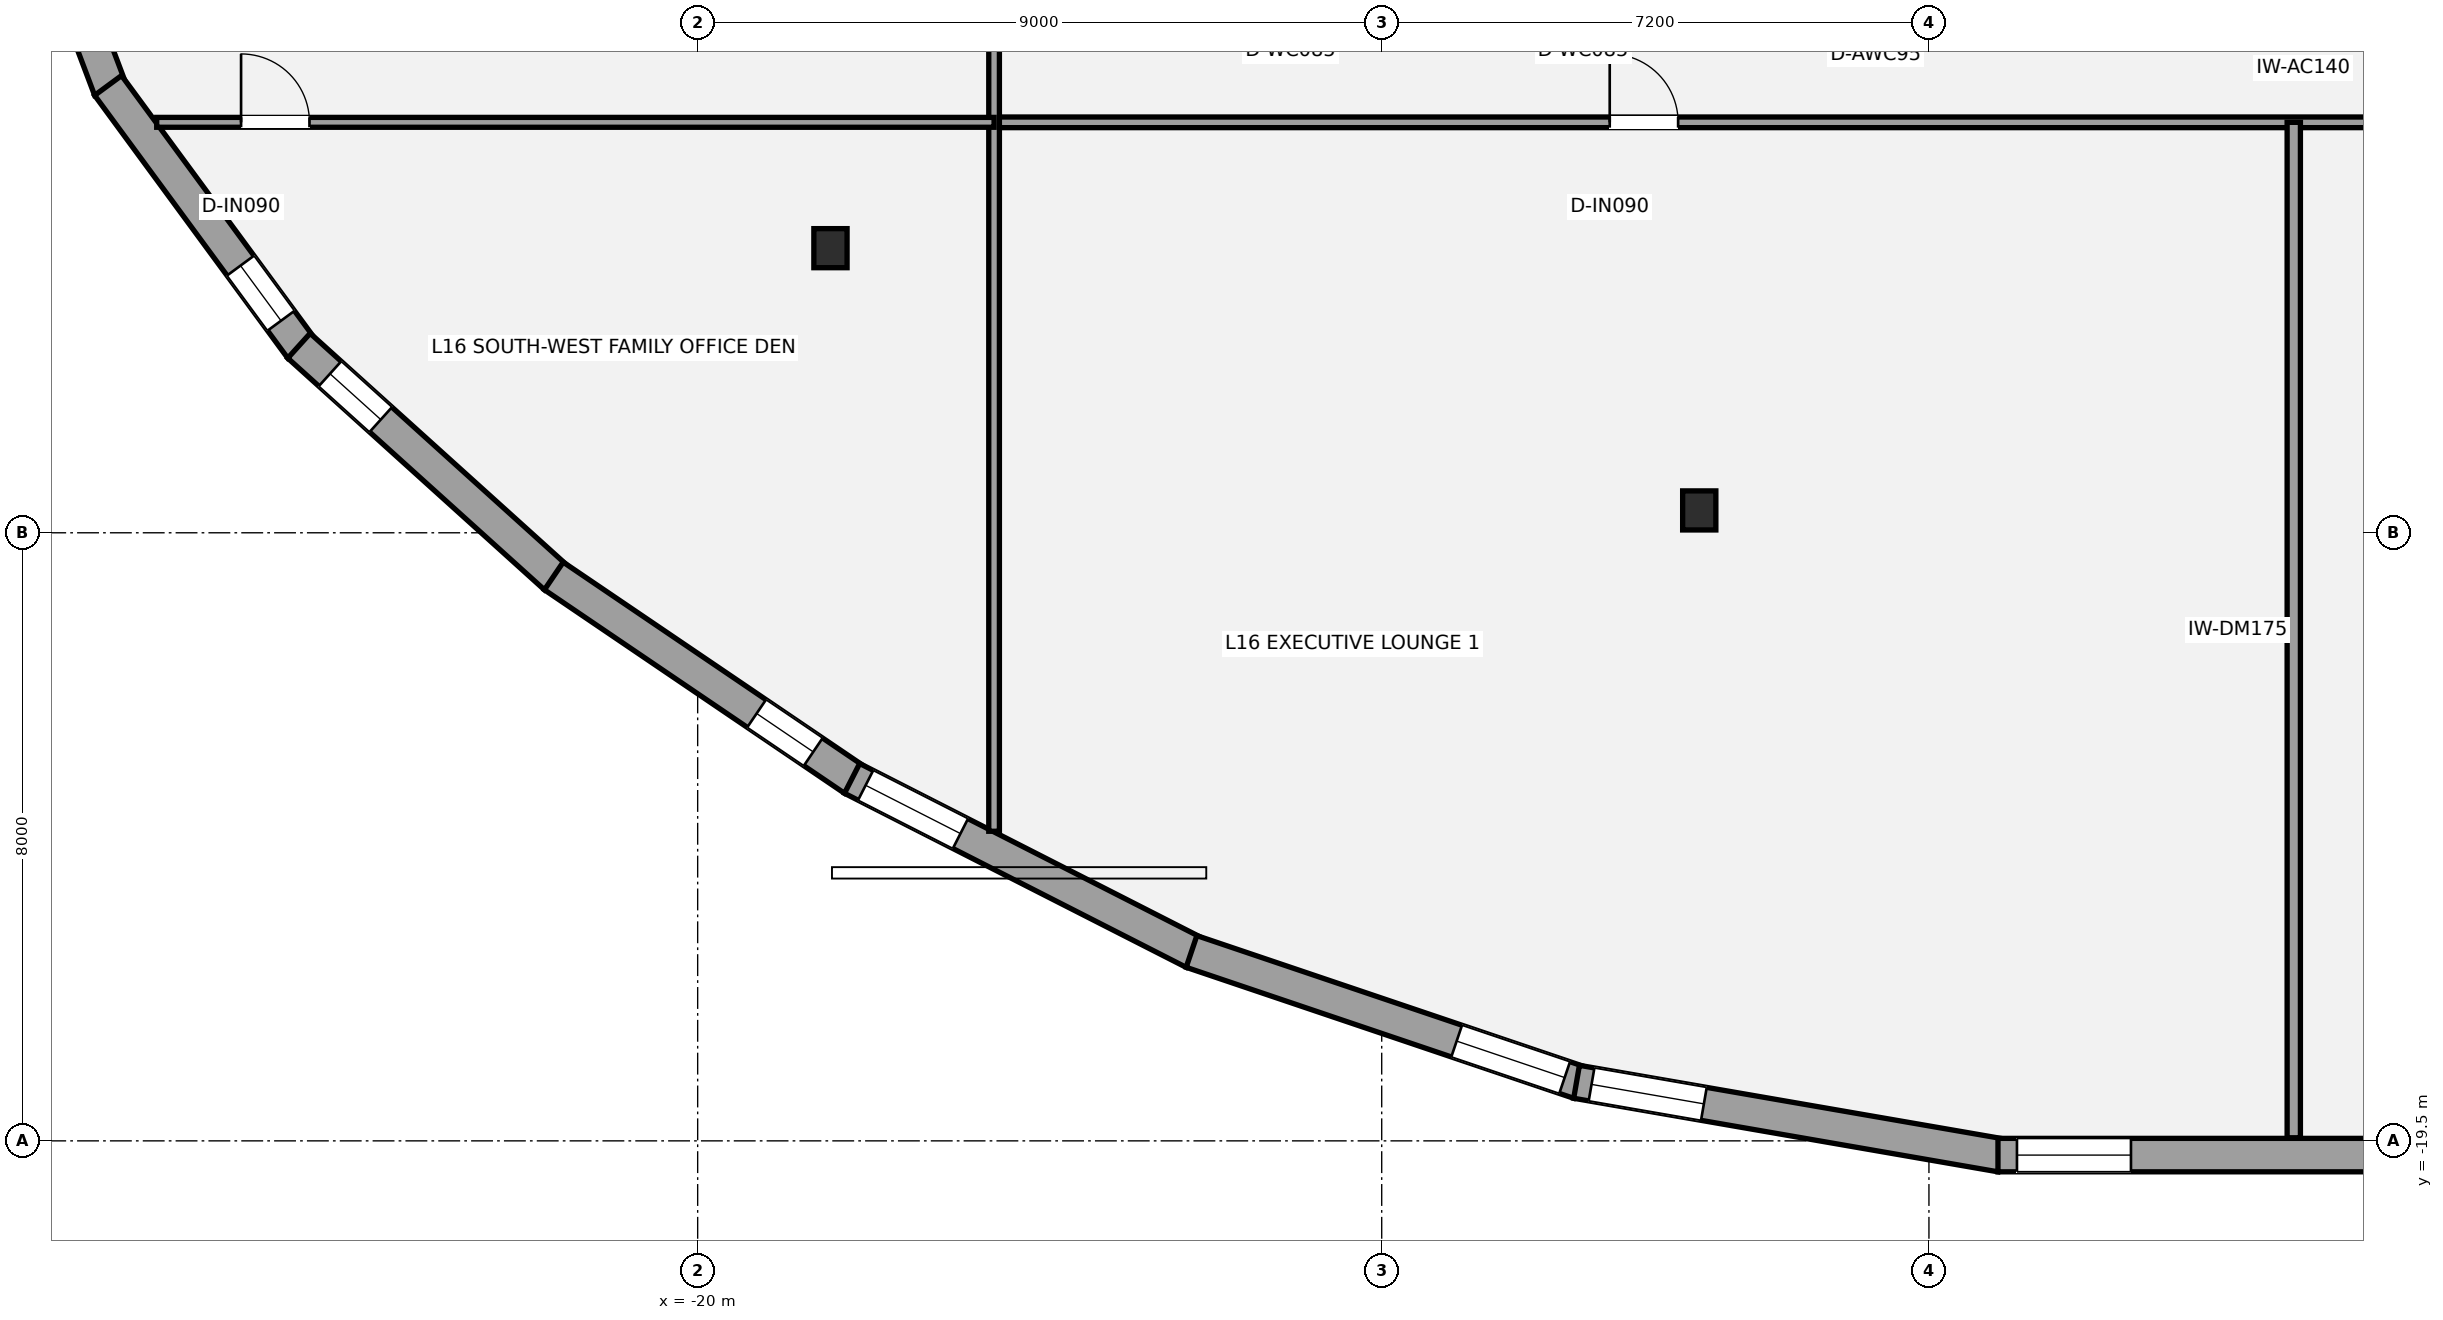
"""IFC4 building model, lengths in metres.
Left out: names, types, materials, properties, quantities, classifications, styles, units other than length and angle.
Written with IfcOpenShell. Run it as: python <this file> out.ifc"""

import sys

from ifc_helpers import new_model, si_unit, direction, frame, frame_2d, origin, origin_2d, place, context, subcontext, project, spatial, rectangle, i_section, extrude, element, fill, save


model = new_model("IFC4")
c1 = context("Model", 3, precision=1e-05, world=origin(), true_north=direction((0.0, 1.0)))
c2 = subcontext(c1, "Body", "Model", "MODEL_VIEW")
j1 = project(units=[si_unit("LENGTHUNIT", "METRE"), si_unit("PLANEANGLEUNIT", "RADIAN")], contexts=[c1])
p1 = place(None, origin())
s1 = spatial("IfcSite", under=j1, at=p1, CompositionType="ELEMENT")
p2 = place(p1, origin())
s2 = spatial("IfcBuilding", under=s1, at=p2, CompositionType="ELEMENT")
p3 = place(p2, frame((0.0, 0.0, 63.0)))
s3 = spatial("IfcBuildingStorey", under=s2, at=p3, CompositionType="ELEMENT", Elevation=63.0)
for number, where, z_axis, x_axis in (
    (1, (-18.253, -7.756, 0.0), (0.0, 0.0, 1.0), (1.0, 0.0, 0.0)),
    (2, (-6.822, -11.206, 0.0), (0.0, 0.0, 1.0), (1.0, 0.0, 0.0)),
):
    element("IfcColumn", number, at=place(p3, frame(where, z_axis=z_axis, x_axis=x_axis)), inside=s3, PredefinedType="COLUMN", context=c2, shape_type="SweptSolid", body=[
        extrude(i_section(OverallWidth=0.437, OverallDepth=0.514, WebThickness=0.061, FlangeThickness=0.097, at=origin_2d()), origin(), (0.0, 0.0, 1.0), 3.6),
    ])
p4 = place(p3, frame((-27.729, -5.668, 0.0), z_axis=(0.0, 0.0, 1.0), x_axis=(-0.352750180024, 0.935717537771, 0.0)))
e3 = element("IfcWall", 3, at=p4, inside=s3, PredefinedType="STANDARD", context=c2, shape_type="SweptSolid", body=[
    extrude(rectangle(XDim=4.045, YDim=0.44, at=frame_2d((2.022, 0.0))), origin(), (0.0, 0.0, 1.0), 2.529),
])
p5 = place(p4, frame((2.845, 0.0, 0.58)))
e4 = element("IfcOpeningElement", 4, at=p5, cuts=e3, PredefinedType="OPENING", context=c2, shape_type="SweptSolid", body=[
    extrude(rectangle(XDim=0.9, YDim=1.35, at=frame_2d((0.45, 0.675))), frame((0.0, 0.23, 0.0), z_axis=(0.0, -1.0, 0.0), x_axis=(1.0, 0.0, 0.0)), (0.0, 0.0, 1.0), 0.46),
])
p6 = place(p3, frame((-25.216, -9.072, 0.0), z_axis=(0.0, 0.0, 1.0), x_axis=(-0.592261182237, 0.80574604685, 0.0)))
e5 = element("IfcWall", 5, at=p6, inside=s3, PredefinedType="STANDARD", context=c2, shape_type="SweptSolid", body=[
    extrude(rectangle(XDim=4.291, YDim=0.44, at=frame_2d((2.146, 0.0))), origin(), (0.0, 0.0, 1.0), 2.529),
])
p7 = place(p6, frame((0.449, 0.0, 0.58)))
e6 = element("IfcOpeningElement", 6, at=p7, cuts=e5, PredefinedType="OPENING", context=c2, shape_type="SweptSolid", body=[
    extrude(rectangle(XDim=0.9, YDim=1.35, at=frame_2d((0.45, 0.675))), frame((0.0, 0.23, 0.0), z_axis=(0.0, -1.0, 0.0), x_axis=(1.0, 0.0, 0.0)), (0.0, 0.0, 1.0), 0.46),
])
p8 = place(p3, frame((-21.869, -12.087, 0.0), z_axis=(0.0, 0.0, 1.0), x_axis=(-0.742354052059, 0.670007806963, 0.0)))
e7 = element("IfcWall", 7, at=p8, inside=s3, PredefinedType="STANDARD", context=c2, shape_type="SweptSolid", body=[
    extrude(rectangle(XDim=4.549, YDim=0.44, at=frame_2d((2.274, 0.0))), origin(), (0.0, 0.0, 1.0), 2.529),
])
p9 = place(p8, frame((3.099, 0.0, 0.58)))
e8 = element("IfcOpeningElement", 8, at=p9, cuts=e7, PredefinedType="OPENING", context=c2, shape_type="SweptSolid", body=[
    extrude(rectangle(XDim=0.9, YDim=1.35, at=frame_2d((0.45, 0.675))), frame((0.0, 0.23, 0.0), z_axis=(0.0, -1.0, 0.0), x_axis=(1.0, 0.0, 0.0)), (0.0, 0.0, 1.0), 0.46),
])
p10 = place(p3, frame((-17.945, -14.745, 0.0), z_axis=(0.0, 0.0, 1.0), x_axis=(-0.827693991977, 0.561179699959, 0.0)))
e9 = element("IfcWall", 9, at=p10, inside=s3, PredefinedType="STANDARD", context=c2, shape_type="SweptSolid", body=[
    extrude(rectangle(XDim=4.77, YDim=0.44, at=frame_2d((2.385, 0.0))), origin(), (0.0, 0.0, 1.0), 2.529),
])
p11 = place(p10, frame((0.646, 0.0, 0.58)))
e10 = element("IfcOpeningElement", 10, at=p11, cuts=e9, PredefinedType="OPENING", context=c2, shape_type="SweptSolid", body=[
    extrude(rectangle(XDim=0.9, YDim=1.35, at=frame_2d((0.45, 0.675))), frame((0.0, 0.23, 0.0), z_axis=(0.0, -1.0, 0.0), x_axis=(1.0, 0.0, 0.0)), (0.0, 0.0, 1.0), 0.46),
])
p12 = place(p3, frame((-13.473, -17.021, 0.0), z_axis=(0.0, 0.0, 1.0), x_axis=(-0.891072734441, 0.45386053137, 0.0)))
e11 = element("IfcWall", 11, at=p12, inside=s3, PredefinedType="STANDARD", context=c2, shape_type="SweptSolid", body=[
    extrude(rectangle(XDim=5.045, YDim=0.44, at=frame_2d((2.522, 0.0))), origin(), (0.0, 0.0, 1.0), 2.529),
])
p13 = place(p12, frame((3.445, 0.0, 0.58)))
e12 = element("IfcOpeningElement", 12, at=p13, cuts=e11, PredefinedType="OPENING", context=c2, shape_type="SweptSolid", body=[
    extrude(rectangle(XDim=1.4, YDim=1.55, at=frame_2d((0.7, 0.775))), frame((0.0, 0.23, 0.0), z_axis=(0.0, -1.0, 0.0), x_axis=(1.0, 0.0, 0.0)), (0.0, 0.0, 1.0), 0.46),
])
p14 = place(p3, frame((-8.403, -18.731, 0.0), z_axis=(0.0, 0.0, 1.0), x_axis=(-0.947368862969, 0.320144088616, 0.0)))
e13 = element("IfcWall", 13, at=p14, inside=s3, PredefinedType="STANDARD", context=c2, shape_type="SweptSolid", body=[
    extrude(rectangle(XDim=5.382, YDim=0.44, at=frame_2d((2.691, 0.0))), origin(), (0.0, 0.0, 1.0), 2.529),
])
p15 = place(p14, frame((0.2, 0.0, 0.48)))
e14 = element("IfcOpeningElement", 14, at=p15, cuts=e13, PredefinedType="OPENING", context=c2, shape_type="SweptSolid", body=[
    extrude(rectangle(XDim=1.5, YDim=1.7, at=frame_2d((0.75, 0.85))), frame((0.0, 0.23, 0.0), z_axis=(0.0, -1.0, 0.0), x_axis=(1.0, 0.0, 0.0)), (0.0, 0.0, 1.0), 0.46),
])
p16 = place(p3, frame((-2.854, -19.69, 0.0), z_axis=(0.0, 0.0, 1.0), x_axis=(-0.985308697227, 0.170782818716, 0.0)))
e15 = element("IfcWall", 15, at=p16, inside=s3, PredefinedType="STANDARD", context=c2, shape_type="SweptSolid", body=[
    extrude(rectangle(XDim=5.665, YDim=0.44, at=frame_2d((2.833, 0.0))), origin(), (0.0, 0.0, 1.0), 2.529),
])
p17 = place(p16, frame((3.965, 0.0, 0.65)))
e16 = element("IfcOpeningElement", 16, at=p17, cuts=e15, PredefinedType="OPENING", context=c2, shape_type="SweptSolid", body=[
    extrude(rectangle(XDim=1.5, YDim=1.7, at=frame_2d((0.75, 0.85))), frame((0.0, 0.23, 0.0), z_axis=(0.0, -1.0, 0.0), x_axis=(1.0, 0.0, 0.0)), (0.0, 0.0, 1.0), 0.46),
])
p18 = place(p3, frame((2.892, -19.687, 0.0), z_axis=(0.0, 0.0, 1.0), x_axis=(-1.0, 0.0, 0.0)))
e17 = element("IfcWall", 17, at=p18, inside=s3, PredefinedType="STANDARD", context=c2, shape_type="SweptSolid", body=[
    extrude(rectangle(XDim=5.784, YDim=0.44, at=frame_2d((2.892, 0.0))), origin(), (0.0, 0.0, 1.0), 2.529),
])
p19 = place(p18, frame((4.034, 0.0, 0.65)))
e18 = element("IfcOpeningElement", 18, at=p19, cuts=e17, PredefinedType="OPENING", context=c2, shape_type="SweptSolid", body=[
    extrude(rectangle(XDim=1.5, YDim=1.7, at=frame_2d((0.75, 0.85))), frame((0.0, 0.23, 0.0), z_axis=(0.0, -1.0, 0.0), x_axis=(1.0, 0.0, 0.0)), (0.0, 0.0, 1.0), 0.46),
])
p20 = place(p3, frame((-16.1, -6.1, 0.0), z_axis=(0.0, 0.0, 1.0), x_axis=(1.0, 0.0, 0.0)))
e19 = element("IfcWall", 19, at=p20, inside=s3, PredefinedType="PARTITIONING", context=c2, shape_type="SweptSolid", body=[
    extrude(rectangle(XDim=34.7, YDim=0.14, at=frame_2d((17.35, 0.0))), origin(), (0.0, 0.0, 1.0), 3.4),
])
p21 = place(p20, frame((8.1, 0.0, 0.0)))
e20 = element("IfcOpeningElement", 20, at=p21, cuts=e19, PredefinedType="OPENING", context=c2, shape_type="SweptSolid", body=[
    extrude(rectangle(XDim=0.9, YDim=2.1, at=frame_2d((0.45, 1.05))), frame((0.0, 0.08, 0.0), z_axis=(0.0, -1.0, 0.0), x_axis=(1.0, 0.0, 0.0)), (0.0, 0.0, 1.0), 0.16),
])
p22 = place(p20, frame((25.45, 0.0, 0.0)))
e21 = element("IfcOpeningElement", 21, at=p22, cuts=e19, PredefinedType="OPENING", context=c2, shape_type="SweptSolid", body=[
    extrude(rectangle(XDim=0.9, YDim=2.1, at=frame_2d((0.45, 1.05))), frame((0.0, 0.08, 0.0), z_axis=(0.0, -1.0, 0.0), x_axis=(1.0, 0.0, 0.0)), (0.0, 0.0, 1.0), 0.16),
])
p23 = place(p3, frame((-16.1, -15.427, 0.0), z_axis=(0.0, 0.0, 1.0), x_axis=(0.0, 1.0, 0.0)))
e22 = element("IfcWall", 22, at=p23, inside=s3, PredefinedType="PARTITIONING", context=c2, shape_type="SweptSolid", body=[
    extrude(rectangle(XDim=21.277, YDim=0.14, at=frame_2d((10.639, 0.0))), origin(), (0.0, 0.0, 1.0), 2.841),
])
p24 = place(p23, frame((12.527, 0.0, 0.0)))
e23 = element("IfcOpeningElement", 23, at=p24, cuts=e22, PredefinedType="OPENING", context=c2, shape_type="SweptSolid", body=[
    extrude(rectangle(XDim=0.9, YDim=2.1, at=frame_2d((0.45, 1.05))), frame((0.0, 0.08, 0.0), z_axis=(0.0, -1.0, 0.0), x_axis=(1.0, 0.0, 0.0)), (0.0, 0.0, 1.0), 0.16),
])
p25 = place(p23, frame((18.501, 0.0, 0.0)))
e24 = element("IfcOpeningElement", 24, at=p25, cuts=e22, PredefinedType="OPENING", context=c2, shape_type="SweptSolid", body=[
    extrude(rectangle(XDim=0.9, YDim=2.1, at=frame_2d((0.45, 1.05))), frame((0.0, 0.08, 0.0), z_axis=(0.0, -1.0, 0.0), x_axis=(1.0, 0.0, 0.0)), (0.0, 0.0, 1.0), 0.16),
])
p26 = place(p3, frame((1.0, -19.459, 0.0), z_axis=(0.0, 0.0, 1.0), x_axis=(0.0, 1.0, 0.0)))
e25 = element("IfcWall", 25, at=p26, inside=s3, PredefinedType="PARTITIONING", context=c2, shape_type="SweptSolid", body=[
    extrude(rectangle(XDim=13.359, YDim=0.175, at=frame_2d((6.68, 0.0))), origin(), (0.0, 0.0, 1.0), 3.4),
])
p27 = place(p3, frame((-27.117, -6.1, 0.0), z_axis=(0.0, 0.0, 1.0), x_axis=(1.0, 0.0, 0.0)))
e26 = element("IfcWall", 26, at=p27, inside=s3, PredefinedType="PARTITIONING", context=c2, shape_type="SweptSolid", body=[
    extrude(rectangle(XDim=11.017, YDim=0.13, at=frame_2d((5.509, 0.0))), origin(), (0.0, 0.0, 1.0), 2.779),
])
p28 = place(p27, frame((1.11, 0.0, 0.0)))
e27 = element("IfcOpeningElement", 27, at=p28, cuts=e26, PredefinedType="OPENING", context=c2, shape_type="SweptSolid", body=[
    extrude(rectangle(XDim=0.9, YDim=2.1, at=frame_2d((0.45, 1.05))), frame((0.0, 0.075, 0.0), z_axis=(0.0, -1.0, 0.0), x_axis=(1.0, 0.0, 0.0)), (0.0, 0.0, 1.0), 0.15),
])
p29 = place(p7, origin())
e28 = element("IfcWindow", 28, at=p29, inside=s3, PartitioningType="SINGLE_PANEL", PredefinedType="WINDOW", context=c2, shape_type="SweptSolid", body=[
    extrude(rectangle(XDim=0.9, YDim=1.35, at=frame_2d((0.45, 0.675))), frame((0.0, -0.01, 0.0), z_axis=(0.0, -1.0, 0.0), x_axis=(1.0, 0.0, 0.0)), (0.0, 0.0, 1.0), 0.06),
])
fill(e6, e28)
p30 = place(p9, origin())
e29 = element("IfcWindow", 29, at=p30, inside=s3, PartitioningType="SINGLE_PANEL", PredefinedType="WINDOW", context=c2, shape_type="SweptSolid", body=[
    extrude(rectangle(XDim=0.9, YDim=1.35, at=frame_2d((0.45, 0.675))), frame((0.0, -0.01, 0.0), z_axis=(0.0, -1.0, 0.0), x_axis=(1.0, 0.0, 0.0)), (0.0, 0.0, 1.0), 0.06),
])
fill(e8, e29)
p31 = place(p11, origin())
e30 = element("IfcWindow", 30, at=p31, inside=s3, PartitioningType="SINGLE_PANEL", PredefinedType="WINDOW", context=c2, shape_type="SweptSolid", body=[
    extrude(rectangle(XDim=0.9, YDim=1.35, at=frame_2d((0.45, 0.675))), frame((0.0, -0.01, 0.0), z_axis=(0.0, -1.0, 0.0), x_axis=(1.0, 0.0, 0.0)), (0.0, 0.0, 1.0), 0.06),
])
fill(e10, e30)
p32 = place(p13, origin())
e31 = element("IfcWindow", 31, at=p32, inside=s3, PartitioningType="SINGLE_PANEL", PredefinedType="WINDOW", context=c2, shape_type="SweptSolid", body=[
    extrude(rectangle(XDim=1.4, YDim=1.55, at=frame_2d((0.7, 0.775))), frame((0.0, -0.01, 0.0), z_axis=(0.0, -1.0, 0.0), x_axis=(1.0, 0.0, 0.0)), (0.0, 0.0, 1.0), 0.06),
])
fill(e12, e31)
p33 = place(p15, origin())
e32 = element("IfcWindow", 32, at=p33, inside=s3, PartitioningType="SINGLE_PANEL", PredefinedType="WINDOW", context=c2, shape_type="SweptSolid", body=[
    extrude(rectangle(XDim=1.5, YDim=1.7, at=frame_2d((0.75, 0.85))), frame((0.0, -0.01, 0.0), z_axis=(0.0, -1.0, 0.0), x_axis=(1.0, 0.0, 0.0)), (0.0, 0.0, 1.0), 0.06),
])
fill(e14, e32)
p34 = place(p17, origin())
e33 = element("IfcWindow", 33, at=p34, inside=s3, PartitioningType="SINGLE_PANEL", PredefinedType="WINDOW", context=c2, shape_type="SweptSolid", body=[
    extrude(rectangle(XDim=1.5, YDim=1.7, at=frame_2d((0.75, 0.85))), frame((0.0, -0.01, 0.0), z_axis=(0.0, -1.0, 0.0), x_axis=(1.0, 0.0, 0.0)), (0.0, 0.0, 1.0), 0.06),
])
fill(e16, e33)
p35 = place(p19, origin())
e34 = element("IfcWindow", 34, at=p35, inside=s3, PartitioningType="SINGLE_PANEL", PredefinedType="WINDOW", context=c2, shape_type="SweptSolid", body=[
    extrude(rectangle(XDim=1.5, YDim=1.7, at=frame_2d((0.75, 0.85))), frame((0.0, -0.01, 0.0), z_axis=(0.0, -1.0, 0.0), x_axis=(1.0, 0.0, 0.0)), (0.0, 0.0, 1.0), 0.06),
])
fill(e18, e34)
p36 = place(p21, origin())
e35 = element("IfcDoor", 35, at=p36, inside=s3, OperationType="SINGLE_SWING_LEFT", PredefinedType="DOOR", context=c2, shape_type="SweptSolid", body=[
    extrude(rectangle(XDim=0.9, YDim=2.1, at=frame_2d((0.45, 1.05))), frame((0.0, 0.025, 0.0), z_axis=(0.0, -1.0, 0.0), x_axis=(1.0, 0.0, 0.0)), (0.0, 0.0, 1.0), 0.05),
])
fill(e20, e35)
p37 = place(p28, origin())
e36 = element("IfcDoor", 36, at=p37, inside=s3, OperationType="SINGLE_SWING_LEFT", PredefinedType="DOOR", context=c2, shape_type="SweptSolid", body=[
    extrude(rectangle(XDim=0.9, YDim=2.1, at=frame_2d((0.45, 1.05))), frame((0.0, 0.025, 0.0), z_axis=(0.0, -1.0, 0.0), x_axis=(1.0, 0.0, 0.0)), (0.0, 0.0, 1.0), 0.05),
])
fill(e27, e36)
save(model, sys.argv[1])
